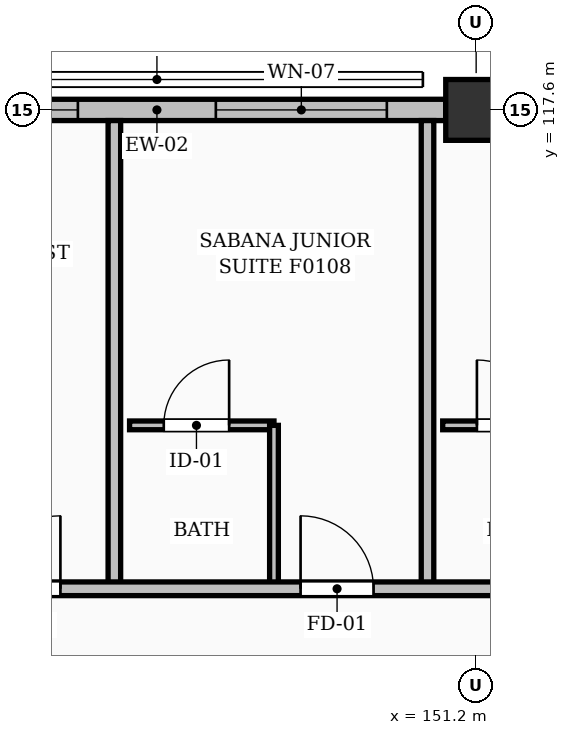
"""IFC4 building model, lengths in metres.
Left out: names, types, materials, properties, quantities, classifications, styles, units other than length and angle.
Written with IfcOpenShell. Run it as: python <this file> out.ifc"""

import sys

from ifc_helpers import new_model, si_unit, direction, frame, frame_2d, origin, origin_2d, place, context, subcontext, project, spatial, rectangle, extrude, element, fill, save


model = new_model("IFC4")
c1 = context("Model", 3, precision=1e-05, world=origin(), true_north=direction((0.0, 1.0)))
c2 = subcontext(c1, "Body", "Model", "MODEL_VIEW")
j1 = project(units=[si_unit("LENGTHUNIT", "METRE"), si_unit("PLANEANGLEUNIT", "RADIAN")], contexts=[c1])
p1 = place(None, origin())
s1 = spatial("IfcSite", under=j1, at=p1, CompositionType="ELEMENT")
p2 = place(p1, origin())
s2 = spatial("IfcBuilding", under=s1, at=p2, CompositionType="ELEMENT")
p3 = place(p2, frame((0.0, 0.0, 3.92)))
s3 = spatial("IfcBuildingStorey", under=s2, at=p3, CompositionType="ELEMENT", Elevation=3.92)
p4 = place(p3, frame((151.2, 117.6, 0.0), z_axis=(0.0, 0.0, 1.0), x_axis=(1.0, 0.0, 0.0)))
e1 = element("IfcColumn", 1, at=p4, inside=s3, PredefinedType="COLUMN", context=c2, shape_type="SweptSolid", body=[
    extrude(rectangle(XDim=0.8, YDim=0.8, at=origin_2d()), origin(), (0.0, 0.0, 1.0), 3.64),
])
p5 = place(p3, frame((143.201, 117.6, 0.0), z_axis=(0.0, 0.0, 1.0), x_axis=(1.0, 0.0, 0.0)))
e2 = element("IfcWall", 2, at=p5, inside=s3, PredefinedType="SOLIDWALL", context=c2, shape_type="SweptSolid", body=[
    extrude(rectangle(XDim=7.598, YDim=0.28, at=frame_2d((3.799, 0.0))), origin(), (0.0, 0.0, 1.0), 2.445),
])
p6 = place(p5, frame((0.539, 0.0, 0.25)))
e3 = element("IfcOpeningElement", 3, at=p6, cuts=e2, PredefinedType="OPENING", context=c2, shape_type="SweptSolid", body=[
    extrude(rectangle(XDim=2.22, YDim=1.9, at=frame_2d((1.11, 0.95))), frame((0.0, 0.15, 0.0), z_axis=(0.0, -1.0, 0.0), x_axis=(1.0, 0.0, 0.0)), (0.0, 0.0, 1.0), 0.3),
])
p7 = place(p5, frame((4.574, 0.0, 0.25)))
e4 = element("IfcOpeningElement", 4, at=p7, cuts=e2, PredefinedType="OPENING", context=c2, shape_type="SweptSolid", body=[
    extrude(rectangle(XDim=2.25, YDim=1.95, at=frame_2d((1.125, 0.975))), frame((0.0, 0.15, 0.0), z_axis=(0.0, -1.0, 0.0), x_axis=(1.0, 0.0, 0.0)), (0.0, 0.0, 1.0), 0.3),
])
p8 = place(p3, frame((146.64, 113.45, 0.0), z_axis=(0.0, 0.0, 1.0), x_axis=(1.0, 0.0, 0.0)))
e5 = element("IfcWall", 5, at=p8, inside=s3, PredefinedType="PARTITIONING", context=c2, shape_type="SweptSolid", body=[
    extrude(rectangle(XDim=1.9, YDim=0.115, at=frame_2d((0.95, 0.0))), origin(), (0.0, 0.0, 1.0), 3.36),
])
p9 = place(p8, frame((0.45, 0.0, 0.0)))
e6 = element("IfcOpeningElement", 6, at=p9, cuts=e5, PredefinedType="OPENING", context=c2, shape_type="SweptSolid", body=[
    extrude(rectangle(XDim=0.86, YDim=2.05, at=frame_2d((0.43, 1.025))), frame((0.0, 0.067, 0.0), z_axis=(0.0, -1.0, 0.0), x_axis=(1.0, 0.0, 0.0)), (0.0, 0.0, 1.0), 0.135),
])
p10 = place(p3, frame((148.54, 111.3, 0.0), z_axis=(0.0, 0.0, 1.0), x_axis=(0.0, 1.0, 0.0)))
e7 = element("IfcWall", 7, at=p10, inside=s3, PredefinedType="PARTITIONING", context=c2, shape_type="SweptSolid", body=[
    extrude(rectangle(XDim=2.15, YDim=0.115, at=frame_2d((1.075, 0.0))), origin(), (0.0, 0.0, 1.0), 3.36),
])
p11 = place(p3, frame((146.44, 111.3, 0.0), z_axis=(0.0, 0.0, 1.0), x_axis=(0.0, 1.0, 0.0)))
e8 = element("IfcWall", 8, at=p11, inside=s3, PredefinedType="PARTITIONING", context=c2, shape_type="SweptSolid", body=[
    extrude(rectangle(XDim=6.16, YDim=0.165, at=frame_2d((3.08, 0.0))), origin(), (0.0, 0.0, 1.0), 3.36),
])
p12 = place(p3, frame((150.76, 113.45, 0.0), z_axis=(0.0, 0.0, 1.0), x_axis=(1.0, 0.0, 0.0)))
e9 = element("IfcWall", 9, at=p12, inside=s3, PredefinedType="PARTITIONING", context=c2, shape_type="SweptSolid", body=[
    extrude(rectangle(XDim=1.9, YDim=0.115, at=frame_2d((0.95, 0.0))), origin(), (0.0, 0.0, 1.0), 3.36),
])
p13 = place(p12, frame((0.45, 0.0, 0.0)))
e10 = element("IfcOpeningElement", 10, at=p13, cuts=e9, PredefinedType="OPENING", context=c2, shape_type="SweptSolid", body=[
    extrude(rectangle(XDim=0.86, YDim=2.05, at=frame_2d((0.43, 1.025))), frame((0.0, 0.067, 0.0), z_axis=(0.0, -1.0, 0.0), x_axis=(1.0, 0.0, 0.0)), (0.0, 0.0, 1.0), 0.135),
])
p14 = place(p3, frame((150.56, 111.3, 0.0), z_axis=(0.0, 0.0, 1.0), x_axis=(0.0, 1.0, 0.0)))
e11 = element("IfcWall", 11, at=p14, inside=s3, PredefinedType="PARTITIONING", context=c2, shape_type="SweptSolid", body=[
    extrude(rectangle(XDim=6.16, YDim=0.165, at=frame_2d((3.08, 0.0))), origin(), (0.0, 0.0, 1.0), 3.36),
])
p15 = place(p3, frame((117.6, 111.3, 0.0), z_axis=(0.0, 0.0, 1.0), x_axis=(1.0, 0.0, 0.0)))
e12 = element("IfcWall", 12, at=p15, inside=s3, PredefinedType="PARTITIONING", context=c2, shape_type="SweptSolid", body=[
    extrude(rectangle(XDim=50.32, YDim=0.18, at=frame_2d((25.16, 0.0))), origin(), (0.0, 0.0, 1.0), 3.36),
])
p16 = place(p15, frame((2.45, 0.0, 0.0)))
e13 = element("IfcOpeningElement", 13, at=p16, cuts=e12, PredefinedType="OPENING", context=c2, shape_type="SweptSolid", body=[
    extrude(rectangle(XDim=0.96, YDim=2.15, at=frame_2d((0.48, 1.075))), frame((0.0, 0.1, 0.0), z_axis=(0.0, -1.0, 0.0), x_axis=(1.0, 0.0, 0.0)), (0.0, 0.0, 1.0), 0.2),
])
p17 = place(p15, frame((6.57, 0.0, 0.0)))
e14 = element("IfcOpeningElement", 14, at=p17, cuts=e12, PredefinedType="OPENING", context=c2, shape_type="SweptSolid", body=[
    extrude(rectangle(XDim=0.96, YDim=2.15, at=frame_2d((0.48, 1.075))), frame((0.0, 0.1, 0.0), z_axis=(0.0, -1.0, 0.0), x_axis=(1.0, 0.0, 0.0)), (0.0, 0.0, 1.0), 0.2),
])
p18 = place(p15, frame((10.69, 0.0, 0.0)))
e15 = element("IfcOpeningElement", 15, at=p18, cuts=e12, PredefinedType="OPENING", context=c2, shape_type="SweptSolid", body=[
    extrude(rectangle(XDim=0.96, YDim=2.15, at=frame_2d((0.48, 1.075))), frame((0.0, 0.1, 0.0), z_axis=(0.0, -1.0, 0.0), x_axis=(1.0, 0.0, 0.0)), (0.0, 0.0, 1.0), 0.2),
])
p19 = place(p15, frame((14.81, 0.0, 0.0)))
e16 = element("IfcOpeningElement", 16, at=p19, cuts=e12, PredefinedType="OPENING", context=c2, shape_type="SweptSolid", body=[
    extrude(rectangle(XDim=0.96, YDim=2.15, at=frame_2d((0.48, 1.075))), frame((0.0, 0.1, 0.0), z_axis=(0.0, -1.0, 0.0), x_axis=(1.0, 0.0, 0.0)), (0.0, 0.0, 1.0), 0.2),
])
p20 = place(p15, frame((18.93, 0.0, 0.0)))
e17 = element("IfcOpeningElement", 17, at=p20, cuts=e12, PredefinedType="OPENING", context=c2, shape_type="SweptSolid", body=[
    extrude(rectangle(XDim=0.96, YDim=2.15, at=frame_2d((0.48, 1.075))), frame((0.0, 0.1, 0.0), z_axis=(0.0, -1.0, 0.0), x_axis=(1.0, 0.0, 0.0)), (0.0, 0.0, 1.0), 0.2),
])
p21 = place(p15, frame((23.05, 0.0, 0.0)))
e18 = element("IfcOpeningElement", 18, at=p21, cuts=e12, PredefinedType="OPENING", context=c2, shape_type="SweptSolid", body=[
    extrude(rectangle(XDim=0.96, YDim=2.15, at=frame_2d((0.48, 1.075))), frame((0.0, 0.1, 0.0), z_axis=(0.0, -1.0, 0.0), x_axis=(1.0, 0.0, 0.0)), (0.0, 0.0, 1.0), 0.2),
])
p22 = place(p15, frame((27.17, 0.0, 0.0)))
e19 = element("IfcOpeningElement", 19, at=p22, cuts=e12, PredefinedType="OPENING", context=c2, shape_type="SweptSolid", body=[
    extrude(rectangle(XDim=0.96, YDim=2.15, at=frame_2d((0.48, 1.075))), frame((0.0, 0.1, 0.0), z_axis=(0.0, -1.0, 0.0), x_axis=(1.0, 0.0, 0.0)), (0.0, 0.0, 1.0), 0.2),
])
p23 = place(p15, frame((31.29, 0.0, 0.0)))
e20 = element("IfcOpeningElement", 20, at=p23, cuts=e12, PredefinedType="OPENING", context=c2, shape_type="SweptSolid", body=[
    extrude(rectangle(XDim=0.96, YDim=2.15, at=frame_2d((0.48, 1.075))), frame((0.0, 0.1, 0.0), z_axis=(0.0, -1.0, 0.0), x_axis=(1.0, 0.0, 0.0)), (0.0, 0.0, 1.0), 0.2),
])
p24 = place(p15, frame((35.41, 0.0, 0.0)))
e21 = element("IfcOpeningElement", 21, at=p24, cuts=e12, PredefinedType="OPENING", context=c2, shape_type="SweptSolid", body=[
    extrude(rectangle(XDim=0.96, YDim=2.15, at=frame_2d((0.48, 1.075))), frame((0.0, 0.1, 0.0), z_axis=(0.0, -1.0, 0.0), x_axis=(1.0, 0.0, 0.0)), (0.0, 0.0, 1.0), 0.2),
])
p25 = place(p15, frame((39.53, 0.0, 0.0)))
e22 = element("IfcOpeningElement", 22, at=p25, cuts=e12, PredefinedType="OPENING", context=c2, shape_type="SweptSolid", body=[
    extrude(rectangle(XDim=0.96, YDim=2.15, at=frame_2d((0.48, 1.075))), frame((0.0, 0.1, 0.0), z_axis=(0.0, -1.0, 0.0), x_axis=(1.0, 0.0, 0.0)), (0.0, 0.0, 1.0), 0.2),
])
p26 = place(p15, frame((43.65, 0.0, 0.0)))
e23 = element("IfcOpeningElement", 23, at=p26, cuts=e12, PredefinedType="OPENING", context=c2, shape_type="SweptSolid", body=[
    extrude(rectangle(XDim=0.96, YDim=2.15, at=frame_2d((0.48, 1.075))), frame((0.0, 0.1, 0.0), z_axis=(0.0, -1.0, 0.0), x_axis=(1.0, 0.0, 0.0)), (0.0, 0.0, 1.0), 0.2),
])
p27 = place(p15, frame((47.77, 0.0, 0.0)))
e24 = element("IfcOpeningElement", 24, at=p27, cuts=e12, PredefinedType="OPENING", context=c2, shape_type="SweptSolid", body=[
    extrude(rectangle(XDim=0.96, YDim=2.15, at=frame_2d((0.48, 1.075))), frame((0.0, 0.1, 0.0), z_axis=(0.0, -1.0, 0.0), x_axis=(1.0, 0.0, 0.0)), (0.0, 0.0, 1.0), 0.2),
])
p28 = place(p6, origin())
e25 = element("IfcWindow", 25, at=p28, inside=s3, PartitioningType="DOUBLE_PANEL_VERTICAL", PredefinedType="WINDOW", context=c2, shape_type="SweptSolid", body=[
    extrude(rectangle(XDim=2.22, YDim=1.9, at=frame_2d((1.11, 0.95))), frame((0.0, 0.03, 0.0), z_axis=(0.0, -1.0, 0.0), x_axis=(1.0, 0.0, 0.0)), (0.0, 0.0, 1.0), 0.06),
])
fill(e3, e25)
p29 = place(p7, origin())
e26 = element("IfcWindow", 26, at=p29, inside=s3, PartitioningType="DOUBLE_PANEL_VERTICAL", PredefinedType="WINDOW", context=c2, shape_type="SweptSolid", body=[
    extrude(rectangle(XDim=2.25, YDim=1.95, at=frame_2d((1.125, 0.975))), frame((0.0, 0.03, 0.0), z_axis=(0.0, -1.0, 0.0), x_axis=(1.0, 0.0, 0.0)), (0.0, 0.0, 1.0), 0.06),
])
fill(e4, e26)
p30 = place(p9, origin())
e27 = element("IfcDoor", 27, at=p30, inside=s3, OperationType="SINGLE_SWING_RIGHT", PredefinedType="DOOR", context=c2, shape_type="SweptSolid", body=[
    extrude(rectangle(XDim=0.86, YDim=2.05, at=frame_2d((0.43, 1.025))), frame((0.0, 0.025, 0.0), z_axis=(0.0, -1.0, 0.0), x_axis=(1.0, 0.0, 0.0)), (0.0, 0.0, 1.0), 0.05),
])
fill(e6, e27)
p31 = place(p13, origin())
e28 = element("IfcDoor", 28, at=p31, inside=s3, OperationType="SINGLE_SWING_LEFT", PredefinedType="DOOR", context=c2, shape_type="SweptSolid", body=[
    extrude(rectangle(XDim=0.86, YDim=2.05, at=frame_2d((0.43, 1.025))), frame((0.0, 0.025, 0.0), z_axis=(0.0, -1.0, 0.0), x_axis=(1.0, 0.0, 0.0)), (0.0, 0.0, 1.0), 0.05),
])
fill(e10, e28)
p32 = place(p22, origin())
e29 = element("IfcDoor", 29, at=p32, inside=s3, OperationType="SINGLE_SWING_RIGHT", PredefinedType="DOOR", context=c2, shape_type="SweptSolid", body=[
    extrude(rectangle(XDim=0.96, YDim=2.15, at=frame_2d((0.48, 1.075))), frame((0.0, 0.025, 0.0), z_axis=(0.0, -1.0, 0.0), x_axis=(1.0, 0.0, 0.0)), (0.0, 0.0, 1.0), 0.05),
])
fill(e19, e29)
p33 = place(p23, origin())
e30 = element("IfcDoor", 30, at=p33, inside=s3, OperationType="SINGLE_SWING_LEFT", PredefinedType="DOOR", context=c2, shape_type="SweptSolid", body=[
    extrude(rectangle(XDim=0.96, YDim=2.15, at=frame_2d((0.48, 1.075))), frame((0.0, 0.025, 0.0), z_axis=(0.0, -1.0, 0.0), x_axis=(1.0, 0.0, 0.0)), (0.0, 0.0, 1.0), 0.05),
])
fill(e20, e30)
save(model, sys.argv[1])
